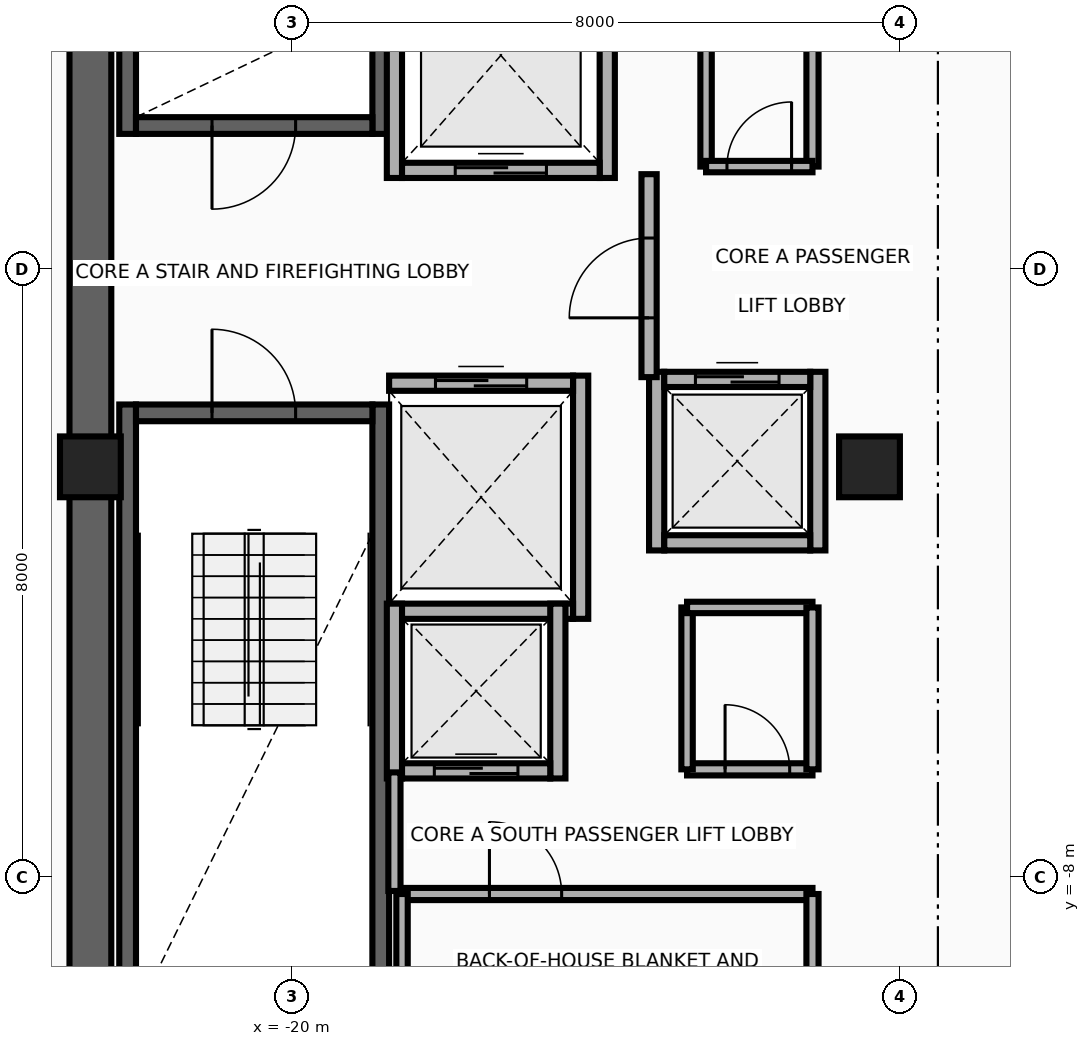
"""IFC4 building model, lengths in metres.
Left out: names, types, materials, properties, quantities, classifications, styles, units other than length and angle.
Written with IfcOpenShell. Run it as: python <this file> out.ifc"""

import sys

from ifc_helpers import new_model, si_unit, direction, frame, frame_2d, origin, origin_2d, place, context, subcontext, project, spatial, rectangle, extrude, source, transform, mapped, element, fill, save


model = new_model("IFC4")
c1 = context("Model", 3, precision=1e-05, world=origin(), true_north=direction((0.0, 1.0)))
c2 = subcontext(c1, "Body", "Model", "MODEL_VIEW")
j1 = project(units=[si_unit("LENGTHUNIT", "METRE"), si_unit("PLANEANGLEUNIT", "RADIAN")], contexts=[c1])
p1 = place(None, origin())
s1 = spatial("IfcSite", under=j1, at=p1, CompositionType="ELEMENT")
p2 = place(p1, origin())
s2 = spatial("IfcBuilding", under=s1, at=p2, CompositionType="ELEMENT")
p3 = place(p2, frame((0.0, 0.0, 240.5)))
s3 = spatial("IfcBuildingStorey", under=s2, at=p3, CompositionType="ELEMENT", Elevation=240.5)
for number, where, z_axis, x_axis in (
    (1, (-22.16, 1.78, 0.0), (0.0, 0.0, 1.0), (0.0, 1.0, 0.0)),
    (2, (-18.83, 1.78, 0.0), (0.0, 0.0, 1.0), (0.0, 1.0, 0.0)),
):
    element("IfcWall", number, at=place(p3, frame(where, z_axis=z_axis, x_axis=x_axis)), inside=s3, PredefinedType="SHEAR", context=c2, shape_type="SweptSolid", body=[
        extrude(rectangle(XDim=8.745, YDim=0.22, at=frame_2d((4.373, 0.0))), origin(), (0.0, 0.0, 1.0), 3.26),
    ])
p4 = place(p3, frame((-22.05, 1.89, 0.0), z_axis=(0.0, 0.0, 1.0), x_axis=(1.0, 0.0, 0.0)))
e3 = element("IfcWall", 3, at=p4, inside=s3, PredefinedType="SHEAR", context=c2, shape_type="SweptSolid", body=[
    extrude(rectangle(XDim=3.11, YDim=0.22, at=frame_2d((1.555, 0.0))), origin(), (0.0, 0.0, 1.0), 3.26),
])
p5 = place(p4, frame((1.0, 0.0, 0.0)))
e4 = element("IfcOpeningElement", 4, at=p5, cuts=e3, PredefinedType="OPENING", context=c2, shape_type="SweptSolid", body=[
    extrude(rectangle(XDim=1.1, YDim=2.15, at=frame_2d((0.55, 1.075))), frame((0.0, 0.125, 0.0), z_axis=(0.0, -1.0, 0.0), x_axis=(1.0, 0.0, 0.0)), (0.0, 0.0, 1.0), 0.25),
])
for number, where, z_axis, x_axis in (
    (5, (-22.16, -10.525, 0.0), (0.0, 0.0, 1.0), (0.0, 1.0, 0.0)),
    (6, (-18.83, -10.525, 0.0), (0.0, 0.0, 1.0), (0.0, 1.0, 0.0)),
):
    element("IfcWall", number, at=place(p3, frame(where, z_axis=z_axis, x_axis=x_axis)), inside=s3, PredefinedType="SHEAR", context=c2, shape_type="SweptSolid", body=[
        extrude(rectangle(XDim=8.745, YDim=0.22, at=frame_2d((4.373, 0.0))), origin(), (0.0, 0.0, 1.0), 3.26),
    ])
p6 = place(p3, frame((-22.05, -1.89, 0.0), z_axis=(0.0, 0.0, 1.0), x_axis=(1.0, 0.0, 0.0)))
e7 = element("IfcWall", 7, at=p6, inside=s3, PredefinedType="SHEAR", context=c2, shape_type="SweptSolid", body=[
    extrude(rectangle(XDim=3.11, YDim=0.22, at=frame_2d((1.555, 0.0))), origin(), (0.0, 0.0, 1.0), 3.26),
])
p7 = place(p6, frame((1.0, 0.0, 0.0)))
e8 = element("IfcOpeningElement", 8, at=p7, cuts=e7, PredefinedType="OPENING", context=c2, shape_type="SweptSolid", body=[
    extrude(rectangle(XDim=1.1, YDim=2.15, at=frame_2d((0.55, 1.075))), frame((0.0, 0.125, 0.0), z_axis=(0.0, -1.0, 0.0), x_axis=(1.0, 0.0, 0.0)), (0.0, 0.0, 1.0), 0.25),
])
p8 = place(p3, frame((-22.65, -11.075, 0.0), z_axis=(0.0, 0.0, 1.0), x_axis=(0.0, 1.0, 0.0)))
e9 = element("IfcWall", 9, at=p8, inside=s3, PredefinedType="SHEAR", context=c2, shape_type="SweptSolid", body=[
    extrude(rectangle(XDim=22.15, YDim=0.55, at=frame_2d((11.075, 0.0))), origin(), (0.0, 0.0, 1.0), 3.26),
])
m1 = source(origin(), c2, "Body", "SweptSolid", [
    extrude(rectangle(XDim=0.8, YDim=0.8, at=origin_2d()), origin(), (0.0, 0.0, 1.0), 3.5),
])
for number, where, z_axis, x_axis in (
    (10, (-22.65, -2.6, 0.0), (0.0, 0.0, 1.0), (1.0, 0.0, 0.0)),
    (11, (-12.4, -2.6, 0.0), (0.0, 0.0, 1.0), (1.0, 0.0, 0.0)),
):
    element("IfcColumn", number, at=place(p3, frame(where, z_axis=z_axis, x_axis=x_axis)), inside=s3, PredefinedType="COLUMN", context=c2, shape_type="MappedRepresentation", body=[
        mapped(m1, transform((0.0, 0.0, 0.0), x_axis=(1.0, 0.0, 0.0), y_axis=(0.0, 1.0, 0.0), z_axis=(0.0, 0.0, 1.0), scale=1.0)),
    ])
for number, where, z_axis, x_axis in (
    (12, (-18.65, 1.2, 0.0), (0.0, 0.0, 1.0), (0.0, 1.0, 0.0)),
    (13, (-15.85, 1.2, 0.0), (0.0, 0.0, 1.0), (0.0, 1.0, 0.0)),
):
    element("IfcWall", number, at=place(p3, frame(where, z_axis=z_axis, x_axis=x_axis)), inside=s3, PredefinedType="MOVABLE", context=c2, shape_type="SweptSolid", body=[
        extrude(rectangle(XDim=3.225, YDim=0.2, at=frame_2d((1.613, 0.0))), origin(), (0.0, 0.0, 1.0), 3.26),
    ])
p9 = place(p3, frame((-18.55, 1.3, 0.0), z_axis=(0.0, 0.0, 1.0), x_axis=(1.0, 0.0, 0.0)))
e14 = element("IfcWall", 14, at=p9, inside=s3, PredefinedType="MOVABLE", context=c2, shape_type="SweptSolid", body=[
    extrude(rectangle(XDim=2.6, YDim=0.2, at=frame_2d((1.3, 0.0))), origin(), (0.0, 0.0, 1.0), 3.26),
])
p10 = place(p9, frame((0.7, 0.0, 0.0)))
e15 = element("IfcOpeningElement", 15, at=p10, cuts=e14, PredefinedType="OPENING", context=c2, shape_type="SweptSolid", body=[
    extrude(rectangle(XDim=1.2, YDim=2.1, at=frame_2d((0.6, 1.05))), frame((0.0, 0.115, 0.0), z_axis=(0.0, -1.0, 0.0), x_axis=(1.0, 0.0, 0.0)), (0.0, 0.0, 1.0), 0.23),
])
p11 = place(p3, frame((-16.2, -4.6, 0.0), z_axis=(0.0, 0.0, 1.0), x_axis=(0.0, 1.0, 0.0)))
e16 = element("IfcWall", 16, at=p11, inside=s3, PredefinedType="MOVABLE", context=c2, shape_type="SweptSolid", body=[
    extrude(rectangle(XDim=3.2, YDim=0.2, at=frame_2d((1.6, 0.0))), origin(), (0.0, 0.0, 1.0), 3.26),
])
p12 = place(p3, frame((-18.72, -4.5, 0.0), z_axis=(0.0, 0.0, 1.0), x_axis=(1.0, 0.0, 0.0)))
e17 = element("IfcWall", 17, at=p12, inside=s3, PredefinedType="MOVABLE", context=c2, shape_type="SweptSolid", body=[
    extrude(rectangle(XDim=2.42, YDim=0.2, at=frame_2d((1.21, 0.0))), origin(), (0.0, 0.0, 1.0), 3.26),
])
p13 = place(p3, frame((-18.72, -1.5, 0.0), z_axis=(0.0, 0.0, 1.0), x_axis=(1.0, 0.0, 0.0)))
e18 = element("IfcWall", 18, at=p13, inside=s3, PredefinedType="MOVABLE", context=c2, shape_type="SweptSolid", body=[
    extrude(rectangle(XDim=2.42, YDim=0.2, at=frame_2d((1.21, 0.0))), origin(), (0.0, 0.0, 1.0), 3.26),
])
p14 = place(p13, frame((0.61, 0.0, 0.0)))
e19 = element("IfcOpeningElement", 19, at=p14, cuts=e18, PredefinedType="OPENING", context=c2, shape_type="SweptSolid", body=[
    extrude(rectangle(XDim=1.2, YDim=2.1, at=frame_2d((0.6, 1.05))), frame((0.0, 0.115, 0.0), z_axis=(0.0, -1.0, 0.0), x_axis=(1.0, 0.0, 0.0)), (0.0, 0.0, 1.0), 0.23),
])
for number, where, z_axis, x_axis in (
    (20, (-18.65, -6.7, 0.0), (0.0, 0.0, 1.0), (0.0, 1.0, 0.0)),
    (21, (-16.5, -6.7, 0.0), (0.0, 0.0, 1.0), (0.0, 1.0, 0.0)),
):
    element("IfcWall", number, at=place(p3, frame(where, z_axis=z_axis, x_axis=x_axis)), inside=s3, PredefinedType="MOVABLE", context=c2, shape_type="SweptSolid", body=[
        extrude(rectangle(XDim=2.3, YDim=0.2, at=frame_2d((1.15, 0.0))), origin(), (0.0, 0.0, 1.0), 3.26),
    ])
p15 = place(p3, frame((-18.55, -6.6, 0.0), z_axis=(0.0, 0.0, 1.0), x_axis=(1.0, 0.0, 0.0)))
e22 = element("IfcWall", 22, at=p15, inside=s3, PredefinedType="MOVABLE", context=c2, shape_type="SweptSolid", body=[
    extrude(rectangle(XDim=1.95, YDim=0.2, at=frame_2d((0.975, 0.0))), origin(), (0.0, 0.0, 1.0), 3.26),
])
p16 = place(p15, frame((0.425, 0.0, 0.0)))
e23 = element("IfcOpeningElement", 23, at=p16, cuts=e22, PredefinedType="OPENING", context=c2, shape_type="SweptSolid", body=[
    extrude(rectangle(XDim=1.1, YDim=2.1, at=frame_2d((0.55, 1.05))), frame((0.0, 0.115, 0.0), z_axis=(0.0, -1.0, 0.0), x_axis=(1.0, 0.0, 0.0)), (0.0, 0.0, 1.0), 0.23),
])
for number, where, z_axis, x_axis in (
    (24, (-15.2, -3.7, 0.0), (0.0, 0.0, 1.0), (0.0, 1.0, 0.0)),
    (25, (-13.08, -3.7, 0.0), (0.0, 0.0, 1.0), (0.0, 1.0, 0.0)),
):
    element("IfcWall", number, at=place(p3, frame(where, z_axis=z_axis, x_axis=x_axis)), inside=s3, PredefinedType="MOVABLE", context=c2, shape_type="SweptSolid", body=[
        extrude(rectangle(XDim=2.35, YDim=0.2, at=frame_2d((1.175, 0.0))), origin(), (0.0, 0.0, 1.0), 3.26),
    ])
p17 = place(p3, frame((-15.1, -3.6, 0.0), z_axis=(0.0, 0.0, 1.0), x_axis=(1.0, 0.0, 0.0)))
e26 = element("IfcWall", 26, at=p17, inside=s3, PredefinedType="MOVABLE", context=c2, shape_type="SweptSolid", body=[
    extrude(rectangle(XDim=1.92, YDim=0.2, at=frame_2d((0.96, 0.0))), origin(), (0.0, 0.0, 1.0), 3.26),
])
p18 = place(p3, frame((-15.1, -1.45, 0.0), z_axis=(0.0, 0.0, 1.0), x_axis=(1.0, 0.0, 0.0)))
e27 = element("IfcWall", 27, at=p18, inside=s3, PredefinedType="MOVABLE", context=c2, shape_type="SweptSolid", body=[
    extrude(rectangle(XDim=1.92, YDim=0.2, at=frame_2d((0.96, 0.0))), origin(), (0.0, 0.0, 1.0), 3.26),
])
p19 = place(p18, frame((0.41, 0.0, 0.0)))
e28 = element("IfcOpeningElement", 28, at=p19, cuts=e27, PredefinedType="OPENING", context=c2, shape_type="SweptSolid", body=[
    extrude(rectangle(XDim=1.1, YDim=2.1, at=frame_2d((0.55, 1.05))), frame((0.0, 0.115, 0.0), z_axis=(0.0, -1.0, 0.0), x_axis=(1.0, 0.0, 0.0)), (0.0, 0.0, 1.0), 0.23),
])
p20 = place(p3, frame((-15.3, -1.42, 0.0), z_axis=(0.0, 0.0, 1.0), x_axis=(0.0, 1.0, 0.0)))
e29 = element("IfcWall", 29, at=p20, inside=s3, PredefinedType="PARTITIONING", context=c2, shape_type="SweptSolid", body=[
    extrude(rectangle(XDim=2.67, YDim=0.2, at=frame_2d((1.335, 0.0))), origin(), (0.0, 0.0, 1.0), 3.26),
])
p21 = place(p20, frame((0.78, 0.0, 0.0)))
e30 = element("IfcOpeningElement", 30, at=p21, cuts=e29, PredefinedType="OPENING", context=c2, shape_type="SweptSolid", body=[
    extrude(rectangle(XDim=1.05, YDim=2.15, at=frame_2d((0.525, 1.075))), frame((0.0, 0.115, 0.0), z_axis=(0.0, -1.0, 0.0), x_axis=(1.0, 0.0, 0.0)), (0.0, 0.0, 1.0), 0.23),
])
p22 = place(p3, frame((-18.65, -8.18, 0.0), z_axis=(0.0, 0.0, 1.0), x_axis=(0.0, 1.0, 0.0)))
e31 = element("IfcWall", 31, at=p22, inside=s3, PredefinedType="PARTITIONING", context=c2, shape_type="SweptSolid", body=[
    extrude(rectangle(XDim=1.56, YDim=0.16, at=frame_2d((0.78, 0.0))), origin(), (0.0, 0.0, 1.0), 3.26),
])
p23 = place(p3, frame((-18.55, -8.22, 0.0), z_axis=(0.0, 0.0, 1.0), x_axis=(1.0, 0.0, 0.0)))
e32 = element("IfcWall", 32, at=p23, inside=s3, PredefinedType="PARTITIONING", context=c2, shape_type="SweptSolid", body=[
    extrude(rectangle(XDim=5.4, YDim=0.16, at=frame_2d((2.7, 0.0))), origin(), (0.0, 0.0, 1.0), 3.26),
])
p24 = place(p23, frame((1.15, 0.0, 0.0)))
e33 = element("IfcOpeningElement", 33, at=p24, cuts=e32, PredefinedType="OPENING", context=c2, shape_type="SweptSolid", body=[
    extrude(rectangle(XDim=0.95, YDim=2.15, at=frame_2d((0.475, 1.075))), frame((0.0, 0.095, 0.0), z_axis=(0.0, -1.0, 0.0), x_axis=(1.0, 0.0, 0.0)), (0.0, 0.0, 1.0), 0.19),
])
p25 = place(p3, frame((-18.55, -10.35, 0.0), z_axis=(0.0, 0.0, 1.0), x_axis=(0.0, 1.0, 0.0)))
e34 = element("IfcWall", 34, at=p25, inside=s3, PredefinedType="PARTITIONING", context=c2, shape_type="SweptSolid", body=[
    extrude(rectangle(XDim=2.13, YDim=0.15, at=frame_2d((1.065, 0.0))), origin(), (0.0, 0.0, 1.0), 3.26),
])
p26 = place(p3, frame((-13.15, -10.35, 0.0), z_axis=(0.0, 0.0, 1.0), x_axis=(0.0, 1.0, 0.0)))
e35 = element("IfcWall", 35, at=p26, inside=s3, PredefinedType="PARTITIONING", context=c2, shape_type="SweptSolid", body=[
    extrude(rectangle(XDim=2.13, YDim=0.16, at=frame_2d((1.065, 0.0))), origin(), (0.0, 0.0, 1.0), 3.26),
])
p27 = place(p3, frame((-14.8, -6.58, 0.0), z_axis=(0.0, 0.0, 1.0), x_axis=(1.0, 0.0, 0.0)))
e36 = element("IfcWall", 36, at=p27, inside=s3, PredefinedType="PARTITIONING", context=c2, shape_type="SweptSolid", body=[
    extrude(rectangle(XDim=1.65, YDim=0.16, at=frame_2d((0.825, 0.0))), origin(), (0.0, 0.0, 1.0), 3.26),
])
p28 = place(p27, frame((0.5, 0.0, 0.0)))
e37 = element("IfcOpeningElement", 37, at=p28, cuts=e36, PredefinedType="OPENING", context=c2, shape_type="SweptSolid", body=[
    extrude(rectangle(XDim=0.85, YDim=2.05, at=frame_2d((0.425, 1.025))), frame((0.0, 0.095, 0.0), z_axis=(0.0, -1.0, 0.0), x_axis=(1.0, 0.0, 0.0)), (0.0, 0.0, 1.0), 0.19),
])
p29 = place(p3, frame((-14.8, -6.58, 0.0), z_axis=(0.0, 0.0, 1.0), x_axis=(0.0, 1.0, 0.0)))
e38 = element("IfcWall", 38, at=p29, inside=s3, PredefinedType="PARTITIONING", context=c2, shape_type="SweptSolid", body=[
    extrude(rectangle(XDim=2.13, YDim=0.15, at=frame_2d((1.065, 0.0))), origin(), (0.0, 0.0, 1.0), 3.26),
])
p30 = place(p3, frame((-14.8, -4.45, 0.0), z_axis=(0.0, 0.0, 1.0), x_axis=(1.0, 0.0, 0.0)))
e39 = element("IfcWall", 39, at=p30, inside=s3, PredefinedType="PARTITIONING", context=c2, shape_type="SweptSolid", body=[
    extrude(rectangle(XDim=1.65, YDim=0.15, at=frame_2d((0.825, 0.0))), origin(), (0.0, 0.0, 1.0), 3.26),
])
p31 = place(p3, frame((-13.15, -6.58, 0.0), z_axis=(0.0, 0.0, 1.0), x_axis=(0.0, 1.0, 0.0)))
e40 = element("IfcWall", 40, at=p31, inside=s3, PredefinedType="PARTITIONING", context=c2, shape_type="SweptSolid", body=[
    extrude(rectangle(XDim=2.13, YDim=0.16, at=frame_2d((1.065, 0.0))), origin(), (0.0, 0.0, 1.0), 3.26),
])
p32 = place(p3, frame((-13.15, 1.35, 0.0), z_axis=(0.0, 0.0, 1.0), x_axis=(0.0, 1.0, 0.0)))
e41 = element("IfcWall", 41, at=p32, inside=s3, PredefinedType="PARTITIONING", context=c2, shape_type="SweptSolid", body=[
    extrude(rectangle(XDim=1.95, YDim=0.16, at=frame_2d((0.975, 0.0))), origin(), (0.0, 0.0, 1.0), 3.26),
])
p33 = place(p3, frame((-14.55, 1.35, 0.0), z_axis=(0.0, 0.0, 1.0), x_axis=(0.0, 1.0, 0.0)))
e42 = element("IfcWall", 42, at=p33, inside=s3, PredefinedType="PARTITIONING", context=c2, shape_type="SweptSolid", body=[
    extrude(rectangle(XDim=1.95, YDim=0.15, at=frame_2d((0.975, 0.0))), origin(), (0.0, 0.0, 1.0), 3.26),
])
p34 = place(p3, frame((-14.55, 1.35, 0.0), z_axis=(0.0, 0.0, 1.0), x_axis=(1.0, 0.0, 0.0)))
e43 = element("IfcWall", 43, at=p34, inside=s3, PredefinedType="PARTITIONING", context=c2, shape_type="SweptSolid", body=[
    extrude(rectangle(XDim=1.4, YDim=0.15, at=frame_2d((0.7, 0.0))), origin(), (0.0, 0.0, 1.0), 3.26),
])
p35 = place(p34, frame((0.275, 0.0, 0.0)))
e44 = element("IfcOpeningElement", 44, at=p35, cuts=e43, PredefinedType="OPENING", context=c2, shape_type="SweptSolid", body=[
    extrude(rectangle(XDim=0.85, YDim=2.05, at=frame_2d((0.425, 1.025))), frame((0.0, 0.09, 0.0), z_axis=(0.0, -1.0, 0.0), x_axis=(1.0, 0.0, 0.0)), (0.0, 0.0, 1.0), 0.18),
])
p36 = place(p10, origin())
e45 = element("IfcDoor", 45, at=p36, inside=s3, OperationType="DOUBLE_DOOR_SLIDING", PredefinedType="DOOR", context=c2, shape_type="SweptSolid", body=[
    extrude(rectangle(XDim=1.2, YDim=2.1, at=frame_2d((0.6, 1.05))), frame((0.0, 0.025, 0.0), z_axis=(0.0, -1.0, 0.0), x_axis=(1.0, 0.0, 0.0)), (0.0, 0.0, 1.0), 0.05),
])
fill(e15, e45)
p37 = place(p14, origin())
e46 = element("IfcDoor", 46, at=p37, inside=s3, OperationType="DOUBLE_DOOR_SLIDING", PredefinedType="DOOR", context=c2, shape_type="SweptSolid", body=[
    extrude(rectangle(XDim=1.2, YDim=2.1, at=frame_2d((0.6, 1.05))), frame((0.0, 0.025, 0.0), z_axis=(0.0, -1.0, 0.0), x_axis=(1.0, 0.0, 0.0)), (0.0, 0.0, 1.0), 0.05),
])
fill(e19, e46)
p38 = place(p16, origin())
e47 = element("IfcDoor", 47, at=p38, inside=s3, OperationType="DOUBLE_DOOR_SLIDING", PredefinedType="DOOR", context=c2, shape_type="SweptSolid", body=[
    extrude(rectangle(XDim=1.1, YDim=2.1, at=frame_2d((0.55, 1.05))), frame((0.0, 0.025, 0.0), z_axis=(0.0, -1.0, 0.0), x_axis=(1.0, 0.0, 0.0)), (0.0, 0.0, 1.0), 0.05),
])
fill(e23, e47)
p39 = place(p19, origin())
e48 = element("IfcDoor", 48, at=p39, inside=s3, OperationType="DOUBLE_DOOR_SLIDING", PredefinedType="DOOR", context=c2, shape_type="SweptSolid", body=[
    extrude(rectangle(XDim=1.1, YDim=2.1, at=frame_2d((0.55, 1.05))), frame((0.0, 0.025, 0.0), z_axis=(0.0, -1.0, 0.0), x_axis=(1.0, 0.0, 0.0)), (0.0, 0.0, 1.0), 0.05),
])
fill(e28, e48)
p40 = place(p21, origin())
e49 = element("IfcDoor", 49, at=p40, inside=s3, OperationType="SINGLE_SWING_RIGHT", PredefinedType="DOOR", context=c2, shape_type="SweptSolid", body=[
    extrude(rectangle(XDim=1.05, YDim=2.15, at=frame_2d((0.525, 1.075))), frame((0.0, 0.025, 0.0), z_axis=(0.0, -1.0, 0.0), x_axis=(1.0, 0.0, 0.0)), (0.0, 0.0, 1.0), 0.05),
])
fill(e30, e49)
p41 = place(p5, frame((1.1, 0.0, 0.0), z_axis=(0.0, 0.0, 1.0), x_axis=(-1.0, 0.0, 0.0)))
e50 = element("IfcDoor", 50, at=p41, inside=s3, OperationType="SINGLE_SWING_LEFT", PredefinedType="DOOR", context=c2, shape_type="SweptSolid", body=[
    extrude(rectangle(XDim=1.1, YDim=2.15, at=frame_2d((0.55, 1.075))), frame((0.0, 0.025, 0.0), z_axis=(0.0, -1.0, 0.0), x_axis=(1.0, 0.0, 0.0)), (0.0, 0.0, 1.0), 0.05),
])
fill(e4, e50)
p42 = place(p7, origin())
e51 = element("IfcDoor", 51, at=p42, inside=s3, OperationType="SINGLE_SWING_RIGHT", PredefinedType="DOOR", context=c2, shape_type="SweptSolid", body=[
    extrude(rectangle(XDim=1.1, YDim=2.15, at=frame_2d((0.55, 1.075))), frame((0.0, 0.025, 0.0), z_axis=(0.0, -1.0, 0.0), x_axis=(1.0, 0.0, 0.0)), (0.0, 0.0, 1.0), 0.05),
])
fill(e8, e51)
p43 = place(p24, origin())
e52 = element("IfcDoor", 52, at=p43, inside=s3, OperationType="SINGLE_SWING_RIGHT", PredefinedType="DOOR", context=c2, shape_type="SweptSolid", body=[
    extrude(rectangle(XDim=0.95, YDim=2.15, at=frame_2d((0.475, 1.075))), frame((0.0, 0.025, 0.0), z_axis=(0.0, -1.0, 0.0), x_axis=(1.0, 0.0, 0.0)), (0.0, 0.0, 1.0), 0.05),
])
fill(e33, e52)
p44 = place(p28, origin())
e53 = element("IfcDoor", 53, at=p44, inside=s3, OperationType="SINGLE_SWING_LEFT", PredefinedType="DOOR", context=c2, shape_type="SweptSolid", body=[
    extrude(rectangle(XDim=0.85, YDim=2.05, at=frame_2d((0.425, 1.025))), frame((0.0, 0.025, 0.0), z_axis=(0.0, -1.0, 0.0), x_axis=(1.0, 0.0, 0.0)), (0.0, 0.0, 1.0), 0.05),
])
fill(e37, e53)
p45 = place(p35, origin())
e54 = element("IfcDoor", 54, at=p45, inside=s3, OperationType="SINGLE_SWING_RIGHT", PredefinedType="DOOR", context=c2, shape_type="SweptSolid", body=[
    extrude(rectangle(XDim=0.85, YDim=2.05, at=frame_2d((0.425, 1.025))), frame((0.0, 0.025, 0.0), z_axis=(0.0, -1.0, 0.0), x_axis=(1.0, 0.0, 0.0)), (0.0, 0.0, 1.0), 0.05),
])
fill(e44, e54)
save(model, sys.argv[1])
